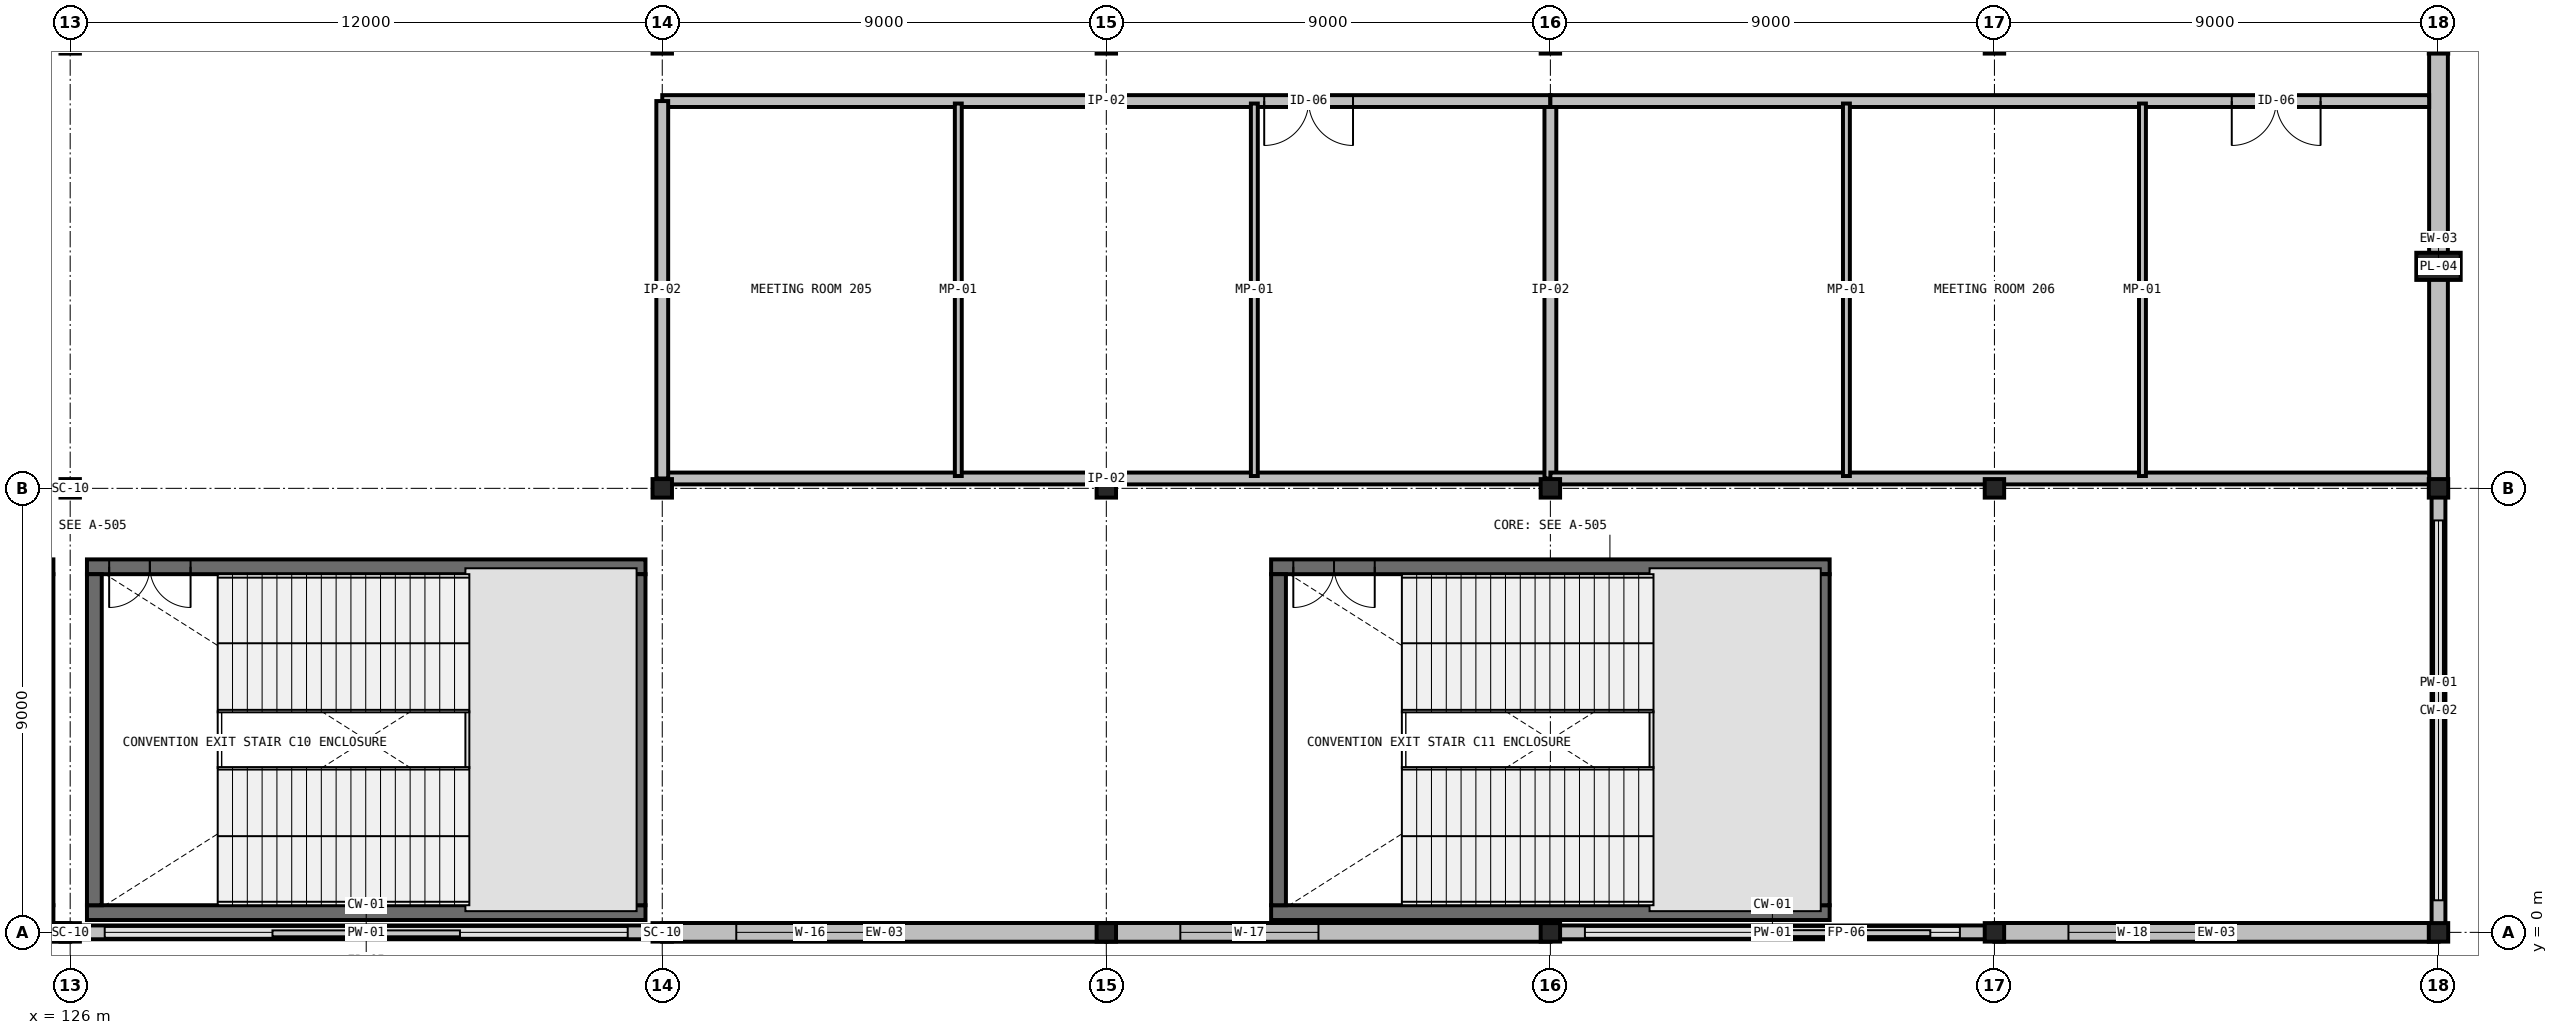
"""IFC4 building model, lengths in metres.
Left out: names, types, materials, properties, quantities, classifications, styles, units other than length and angle.
Written with IfcOpenShell. Run it as: python <this file> out.ifc"""

import sys

from ifc_helpers import new_model, si_unit, direction, frame, frame_2d, origin, origin_2d, place, context, subcontext, project, spatial, rectangle, i_section, extrude, element, fill, save


model = new_model("IFC4")
c1 = context("Model", 3, precision=1e-05, world=origin(), true_north=direction((0.0, 1.0)))
c2 = subcontext(c1, "Body", "Model", "MODEL_VIEW")
j1 = project(units=[si_unit("LENGTHUNIT", "METRE"), si_unit("PLANEANGLEUNIT", "RADIAN")], contexts=[c1])
p1 = place(None, origin())
s1 = spatial("IfcSite", under=j1, at=p1, CompositionType="ELEMENT")
p2 = place(p1, origin())
s2 = spatial("IfcBuilding", under=s1, at=p2, CompositionType="ELEMENT")
p3 = place(p2, frame((0.0, 0.0, 12.0)))
s3 = spatial("IfcBuildingStorey", under=s2, at=p3, CompositionType="ELEMENT", Elevation=12.0)
for number, where, z_axis, x_axis in (
    (1, (126.0, 0.0, 0.0), (0.0, 0.0, 1.0), (1.0, 0.0, 0.0)),
    (2, (126.0, 9.0, 0.0), (0.0, 0.0, 1.0), (1.0, 0.0, 0.0)),
    (3, (126.0, 18.0, 0.0), (0.0, 0.0, 1.0), (1.0, 0.0, 0.0)),
    (4, (138.0, 0.0, 0.0), (0.0, 0.0, 1.0), (1.0, 0.0, 0.0)),
    (5, (138.0, 9.0, 0.0), (0.0, 0.0, 1.0), (1.0, 0.0, 0.0)),
    (6, (138.0, 18.0, 0.0), (0.0, 0.0, 1.0), (1.0, 0.0, 0.0)),
    (7, (147.0, 0.0, 0.0), (0.0, 0.0, 1.0), (1.0, 0.0, 0.0)),
    (8, (147.0, 9.0, 0.0), (0.0, 0.0, 1.0), (1.0, 0.0, 0.0)),
    (9, (147.0, 18.0, 0.0), (0.0, 0.0, 1.0), (1.0, 0.0, 0.0)),
    (10, (156.0, 0.0, 0.0), (0.0, 0.0, 1.0), (1.0, 0.0, 0.0)),
    (11, (156.0, 9.0, 0.0), (0.0, 0.0, 1.0), (1.0, 0.0, 0.0)),
    (12, (156.0, 18.0, 0.0), (0.0, 0.0, 1.0), (1.0, 0.0, 0.0)),
    (13, (165.0, 0.0, 0.0), (0.0, 0.0, 1.0), (1.0, 0.0, 0.0)),
    (14, (165.0, 9.0, 0.0), (0.0, 0.0, 1.0), (1.0, 0.0, 0.0)),
    (15, (165.0, 18.0, 0.0), (0.0, 0.0, 1.0), (1.0, 0.0, 0.0)),
    (16, (174.0, 0.0, 0.0), (0.0, 0.0, 1.0), (1.0, 0.0, 0.0)),
    (17, (174.0, 9.0, 0.0), (0.0, 0.0, 1.0), (1.0, 0.0, 0.0)),
    (18, (174.0, 18.0, 0.0), (0.0, 0.0, 1.0), (1.0, 0.0, 0.0)),
):
    element("IfcColumn", number, at=place(p3, frame(where, z_axis=z_axis, x_axis=x_axis)), inside=s3, PredefinedType="COLUMN", context=c2, shape_type="SweptSolid", body=[
        extrude(i_section(OverallWidth=0.394, OverallDepth=0.375, WebThickness=0.017, FlangeThickness=0.028, FilletRadius=0.031, at=origin_2d()), origin(), (0.0, 0.0, 1.0), 6.0),
    ])
p4 = place(p3, frame((174.0, 13.5, 0.0), z_axis=(0.0, 0.0, 1.0), x_axis=(0.0, 1.0, 0.0)))
e19 = element("IfcColumn", 19, at=p4, inside=s3, PredefinedType="PILASTER", context=c2, shape_type="SweptSolid", body=[
    extrude(rectangle(XDim=0.55, YDim=0.9, at=origin_2d()), origin(), (0.0, 0.0, 1.0), 6.0),
])
p5 = place(p3, frame((125.66, 0.4, 0.0), z_axis=(0.0, 0.0, 1.0), x_axis=(-1.0, 0.0, 0.0)))
e20 = element("IfcWall", 20, at=p5, inside=s3, PredefinedType="SHEAR", context=c2, shape_type="SweptSolid", body=[
    extrude(rectangle(XDim=11.32, YDim=0.3, at=frame_2d((5.66, 0.0))), origin(), (0.0, 0.0, 1.0), 6.0),
])
p6 = place(p3, frame((125.66, 7.41, 0.0), z_axis=(0.0, 0.0, 1.0), x_axis=(-1.0, 0.0, 0.0)))
e21 = element("IfcWall", 21, at=p6, inside=s3, PredefinedType="SHEAR", context=c2, shape_type="SweptSolid", body=[
    extrude(rectangle(XDim=11.32, YDim=0.3, at=frame_2d((5.66, 0.0))), origin(), (0.0, 0.0, 1.0), 6.0),
])
p7 = place(p6, frame((9.22, 0.0, 0.0)))
e22 = element("IfcOpeningElement", 22, at=p7, cuts=e21, PredefinedType="OPENING", context=c2, shape_type="SweptSolid", body=[
    extrude(rectangle(XDim=1.65, YDim=2.25, at=frame_2d((0.825, 1.125))), frame((0.0, 0.165, 0.0), z_axis=(0.0, -1.0, 0.0), x_axis=(1.0, 0.0, 0.0)), (0.0, 0.0, 1.0), 0.33),
])
p8 = place(p3, frame((125.51, 0.55, 0.0), z_axis=(0.0, 0.0, 1.0), x_axis=(0.0, 1.0, 0.0)))
e23 = element("IfcWall", 23, at=p8, inside=s3, PredefinedType="SHEAR", context=c2, shape_type="SweptSolid", body=[
    extrude(rectangle(XDim=6.71, YDim=0.3, at=frame_2d((3.355, 0.0))), origin(), (0.0, 0.0, 1.0), 6.0),
])
p9 = place(p3, frame((137.66, 0.4, 0.0), z_axis=(0.0, 0.0, 1.0), x_axis=(-1.0, 0.0, 0.0)))
e24 = element("IfcWall", 24, at=p9, inside=s3, PredefinedType="SHEAR", context=c2, shape_type="SweptSolid", body=[
    extrude(rectangle(XDim=11.32, YDim=0.3, at=frame_2d((5.66, 0.0))), origin(), (0.0, 0.0, 1.0), 6.0),
])
p10 = place(p3, frame((137.66, 7.41, 0.0), z_axis=(0.0, 0.0, 1.0), x_axis=(-1.0, 0.0, 0.0)))
e25 = element("IfcWall", 25, at=p10, inside=s3, PredefinedType="SHEAR", context=c2, shape_type="SweptSolid", body=[
    extrude(rectangle(XDim=11.32, YDim=0.3, at=frame_2d((5.66, 0.0))), origin(), (0.0, 0.0, 1.0), 6.0),
])
p11 = place(p10, frame((9.22, 0.0, 0.0)))
e26 = element("IfcOpeningElement", 26, at=p11, cuts=e25, PredefinedType="OPENING", context=c2, shape_type="SweptSolid", body=[
    extrude(rectangle(XDim=1.65, YDim=2.25, at=frame_2d((0.825, 1.125))), frame((0.0, 0.165, 0.0), z_axis=(0.0, -1.0, 0.0), x_axis=(1.0, 0.0, 0.0)), (0.0, 0.0, 1.0), 0.33),
])
for number, where, z_axis, x_axis in (
    (27, (126.49, 7.26, 0.0), (0.0, 0.0, 1.0), (0.0, -1.0, 0.0)),
    (28, (137.51, 0.55, 0.0), (0.0, 0.0, 1.0), (0.0, 1.0, 0.0)),
):
    element("IfcWall", number, at=place(p3, frame(where, z_axis=z_axis, x_axis=x_axis)), inside=s3, PredefinedType="SHEAR", context=c2, shape_type="SweptSolid", body=[
        extrude(rectangle(XDim=6.71, YDim=0.3, at=frame_2d((3.355, 0.0))), origin(), (0.0, 0.0, 1.0), 6.0),
    ])
p12 = place(p3, frame((161.66, 0.4, 0.0), z_axis=(0.0, 0.0, 1.0), x_axis=(-1.0, 0.0, 0.0)))
e29 = element("IfcWall", 29, at=p12, inside=s3, PredefinedType="SHEAR", context=c2, shape_type="SweptSolid", body=[
    extrude(rectangle(XDim=11.32, YDim=0.3, at=frame_2d((5.66, 0.0))), origin(), (0.0, 0.0, 1.0), 6.0),
])
p13 = place(p3, frame((161.66, 7.41, 0.0), z_axis=(0.0, 0.0, 1.0), x_axis=(-1.0, 0.0, 0.0)))
e30 = element("IfcWall", 30, at=p13, inside=s3, PredefinedType="SHEAR", context=c2, shape_type="SweptSolid", body=[
    extrude(rectangle(XDim=11.32, YDim=0.3, at=frame_2d((5.66, 0.0))), origin(), (0.0, 0.0, 1.0), 6.0),
])
p14 = place(p13, frame((9.22, 0.0, 0.0)))
e31 = element("IfcOpeningElement", 31, at=p14, cuts=e30, PredefinedType="OPENING", context=c2, shape_type="SweptSolid", body=[
    extrude(rectangle(XDim=1.65, YDim=2.25, at=frame_2d((0.825, 1.125))), frame((0.0, 0.165, 0.0), z_axis=(0.0, -1.0, 0.0), x_axis=(1.0, 0.0, 0.0)), (0.0, 0.0, 1.0), 0.33),
])
for number, where, z_axis, x_axis in (
    (32, (150.49, 7.26, 0.0), (0.0, 0.0, 1.0), (0.0, -1.0, 0.0)),
    (33, (161.51, 0.55, 0.0), (0.0, 0.0, 1.0), (0.0, 1.0, 0.0)),
):
    element("IfcWall", number, at=place(p3, frame(where, z_axis=z_axis, x_axis=x_axis)), inside=s3, PredefinedType="SHEAR", context=c2, shape_type="SweptSolid", body=[
        extrude(rectangle(XDim=6.71, YDim=0.3, at=frame_2d((3.355, 0.0))), origin(), (0.0, 0.0, 1.0), 6.0),
    ])
p15 = place(p3, frame((114.0, 0.0, 0.0), z_axis=(0.0, 0.0, 1.0), x_axis=(1.0, 0.0, 0.0)))
e34 = element("IfcWall", 34, at=p15, inside=s3, PredefinedType="STANDARD", context=c2, shape_type="SweptSolid", body=[
    extrude(rectangle(XDim=12.0, YDim=0.38, at=frame_2d((6.0, 0.0))), origin(), (0.0, 0.0, 1.0), 4.746),
])
p16 = place(p15, frame((1.5, 0.0, 0.85)))
e35 = element("IfcOpeningElement", 35, at=p16, cuts=e34, PredefinedType="OPENING", context=c2, shape_type="SweptSolid", body=[
    extrude(rectangle(XDim=2.2, YDim=1.95, at=frame_2d((1.1, 0.975))), frame((0.0, 0.205, 0.0), z_axis=(0.0, -1.0, 0.0), x_axis=(1.0, 0.0, 0.0)), (0.0, 0.0, 1.0), 0.41),
])
p17 = place(p3, frame((126.0, 0.0, 0.0), z_axis=(0.0, 0.0, 1.0), x_axis=(1.0, 0.0, 0.0)))
e36 = element("IfcWall", 36, at=p17, inside=s3, PredefinedType="PARAPET", context=c2, shape_type="SweptSolid", body=[
    extrude(rectangle(XDim=12.0, YDim=0.28, at=frame_2d((6.0, 0.0))), origin(), (0.0, 0.0, 1.0), 0.2),
])
p18 = place(p3, frame((138.0, 0.0, 0.0), z_axis=(0.0, 0.0, 1.0), x_axis=(1.0, 0.0, 0.0)))
e37 = element("IfcWall", 37, at=p18, inside=s3, PredefinedType="STANDARD", context=c2, shape_type="SweptSolid", body=[
    extrude(rectangle(XDim=9.0, YDim=0.38, at=frame_2d((4.5, 0.0))), origin(), (0.0, 0.0, 1.0), 4.746),
])
p19 = place(p18, frame((1.5, 0.0, 0.85)))
e38 = element("IfcOpeningElement", 38, at=p19, cuts=e37, PredefinedType="OPENING", context=c2, shape_type="SweptSolid", body=[
    extrude(rectangle(XDim=3.0, YDim=2.3, at=frame_2d((1.5, 1.15))), frame((0.0, 0.205, 0.0), z_axis=(0.0, -1.0, 0.0), x_axis=(1.0, 0.0, 0.0)), (0.0, 0.0, 1.0), 0.41),
])
p20 = place(p3, frame((147.0, 0.0, 0.0), z_axis=(0.0, 0.0, 1.0), x_axis=(1.0, 0.0, 0.0)))
e39 = element("IfcWall", 39, at=p20, inside=s3, PredefinedType="STANDARD", context=c2, shape_type="SweptSolid", body=[
    extrude(rectangle(XDim=9.0, YDim=0.38, at=frame_2d((4.5, 0.0))), origin(), (0.0, 0.0, 1.0), 4.746),
])
p21 = place(p20, frame((1.5, 0.0, 0.85)))
e40 = element("IfcOpeningElement", 40, at=p21, cuts=e39, PredefinedType="OPENING", context=c2, shape_type="SweptSolid", body=[
    extrude(rectangle(XDim=2.8, YDim=2.4, at=frame_2d((1.4, 1.2))), frame((0.0, 0.205, 0.0), z_axis=(0.0, -1.0, 0.0), x_axis=(1.0, 0.0, 0.0)), (0.0, 0.0, 1.0), 0.41),
])
p22 = place(p3, frame((156.0, 0.0, 0.0), z_axis=(0.0, 0.0, 1.0), x_axis=(1.0, 0.0, 0.0)))
e41 = element("IfcWall", 41, at=p22, inside=s3, PredefinedType="PARAPET", context=c2, shape_type="SweptSolid", body=[
    extrude(rectangle(XDim=9.0, YDim=0.28, at=frame_2d((4.5, 0.0))), origin(), (0.0, 0.0, 1.0), 0.2),
])
p23 = place(p3, frame((165.0, 0.0, 0.0), z_axis=(0.0, 0.0, 1.0), x_axis=(1.0, 0.0, 0.0)))
e42 = element("IfcWall", 42, at=p23, inside=s3, PredefinedType="STANDARD", context=c2, shape_type="SweptSolid", body=[
    extrude(rectangle(XDim=9.0, YDim=0.38, at=frame_2d((4.5, 0.0))), origin(), (0.0, 0.0, 1.0), 4.746),
])
p24 = place(p23, frame((1.5, 0.0, 0.85)))
e43 = element("IfcOpeningElement", 43, at=p24, cuts=e42, PredefinedType="OPENING", context=c2, shape_type="SweptSolid", body=[
    extrude(rectangle(XDim=2.6, YDim=2.25, at=frame_2d((1.3, 1.125))), frame((0.0, 0.205, 0.0), z_axis=(0.0, -1.0, 0.0), x_axis=(1.0, 0.0, 0.0)), (0.0, 0.0, 1.0), 0.41),
])
p25 = place(p3, frame((174.0, 0.0, 0.0), z_axis=(0.0, 0.0, 1.0), x_axis=(0.0, 1.0, 0.0)))
e44 = element("IfcWall", 44, at=p25, inside=s3, PredefinedType="PARAPET", context=c2, shape_type="SweptSolid", body=[
    extrude(rectangle(XDim=9.0, YDim=0.28, at=frame_2d((4.5, 0.0))), origin(), (0.0, 0.0, 1.0), 0.2),
])
p26 = place(p3, frame((174.0, 9.0, 0.0), z_axis=(0.0, 0.0, 1.0), x_axis=(0.0, 1.0, 0.0)))
e45 = element("IfcWall", 45, at=p26, inside=s3, PredefinedType="STANDARD", context=c2, shape_type="SweptSolid", body=[
    extrude(rectangle(XDim=9.0, YDim=0.38, at=frame_2d((4.5, 0.0))), origin(), (0.0, 0.0, 1.0), 5.239),
])
p27 = place(p3, frame((138.0, 9.2, 0.0), z_axis=(0.0, 0.0, 1.0), x_axis=(1.0, 0.0, 0.0)))
e46 = element("IfcWall", 46, at=p27, inside=s3, PredefinedType="PARTITIONING", context=c2, shape_type="SweptSolid", body=[
    extrude(rectangle(XDim=18.0, YDim=0.24, at=frame_2d((9.0, 0.0))), origin(), (0.0, 0.0, 1.0), 5.65),
])
p28 = place(p3, frame((156.0, 9.2, 0.0), z_axis=(0.0, 0.0, 1.0), x_axis=(0.0, 1.0, 0.0)))
e47 = element("IfcWall", 47, at=p28, inside=s3, PredefinedType="PARTITIONING", context=c2, shape_type="SweptSolid", body=[
    extrude(rectangle(XDim=7.65, YDim=0.24, at=frame_2d((3.825, 0.0))), origin(), (0.0, 0.0, 1.0), 4.883),
])
p29 = place(p3, frame((156.0, 16.85, 0.0), z_axis=(0.0, 0.0, 1.0), x_axis=(-1.0, 0.0, 0.0)))
e48 = element("IfcWall", 48, at=p29, inside=s3, PredefinedType="PARTITIONING", context=c2, shape_type="SweptSolid", body=[
    extrude(rectangle(XDim=18.0, YDim=0.24, at=frame_2d((9.0, 0.0))), origin(), (0.0, 0.0, 1.0), 5.65),
])
p30 = place(p29, frame((4.0, 0.0, 0.0)))
e49 = element("IfcOpeningElement", 49, at=p30, cuts=e48, PredefinedType="OPENING", context=c2, shape_type="SweptSolid", body=[
    extrude(rectangle(XDim=1.8, YDim=2.3, at=frame_2d((0.9, 1.15))), frame((0.0, 0.135, 0.0), z_axis=(0.0, -1.0, 0.0), x_axis=(1.0, 0.0, 0.0)), (0.0, 0.0, 1.0), 0.27),
])
p31 = place(p3, frame((138.0, 16.85, 0.0), z_axis=(0.0, 0.0, 1.0), x_axis=(0.0, -1.0, 0.0)))
e50 = element("IfcWall", 50, at=p31, inside=s3, PredefinedType="PARTITIONING", context=c2, shape_type="SweptSolid", body=[
    extrude(rectangle(XDim=7.65, YDim=0.24, at=frame_2d((3.825, 0.0))), origin(), (0.0, 0.0, 1.0), 4.883),
])
p32 = place(p3, frame((156.0, 9.2, 0.0), z_axis=(0.0, 0.0, 1.0), x_axis=(1.0, 0.0, 0.0)))
e51 = element("IfcWall", 51, at=p32, inside=s3, PredefinedType="PARTITIONING", context=c2, shape_type="SweptSolid", body=[
    extrude(rectangle(XDim=17.81, YDim=0.24, at=frame_2d((8.905, 0.0))), origin(), (0.0, 0.0, 1.0), 5.65),
])
p33 = place(p3, frame((173.81, 16.85, 0.0), z_axis=(0.0, 0.0, 1.0), x_axis=(-1.0, 0.0, 0.0)))
e52 = element("IfcWall", 52, at=p33, inside=s3, PredefinedType="PARTITIONING", context=c2, shape_type="SweptSolid", body=[
    extrude(rectangle(XDim=17.81, YDim=0.24, at=frame_2d((8.905, 0.0))), origin(), (0.0, 0.0, 1.0), 5.65),
])
p34 = place(p33, frame((2.2, 0.0, 0.0)))
e53 = element("IfcOpeningElement", 53, at=p34, cuts=e52, PredefinedType="OPENING", context=c2, shape_type="SweptSolid", body=[
    extrude(rectangle(XDim=1.8, YDim=2.3, at=frame_2d((0.9, 1.15))), frame((0.0, 0.135, 0.0), z_axis=(0.0, -1.0, 0.0), x_axis=(1.0, 0.0, 0.0)), (0.0, 0.0, 1.0), 0.27),
])
for number, where, z_axis, x_axis in (
    (54, (144.0, 9.25, 0.0), (0.0, 0.0, 1.0), (0.0, 1.0, 0.0)),
    (55, (150.0, 9.25, 0.0), (0.0, 0.0, 1.0), (0.0, 1.0, 0.0)),
    (56, (162.0, 9.25, 0.0), (0.0, 0.0, 1.0), (0.0, 1.0, 0.0)),
    (57, (168.0, 9.25, 0.0), (0.0, 0.0, 1.0), (0.0, 1.0, 0.0)),
):
    element("IfcWall", number, at=place(p3, frame(where, z_axis=z_axis, x_axis=x_axis)), inside=s3, PredefinedType="MOVABLE", context=c2, shape_type="SweptSolid", body=[
        extrude(rectangle(XDim=7.55, YDim=0.14, at=frame_2d((3.775, 0.0))), origin(), (0.0, 0.0, 1.0), 5.65),
    ])
p35 = place(p11, origin())
e58 = element("IfcDoor", 58, at=p35, inside=s3, OperationType="DOUBLE_DOOR_SINGLE_SWING", PredefinedType="DOOR", context=c2, shape_type="SweptSolid", body=[
    extrude(rectangle(XDim=1.65, YDim=2.25, at=frame_2d((0.825, 1.125))), frame((0.0, 0.025, 0.0), z_axis=(0.0, -1.0, 0.0), x_axis=(1.0, 0.0, 0.0)), (0.0, 0.0, 1.0), 0.05),
])
fill(e26, e58)
p36 = place(p14, origin())
e59 = element("IfcDoor", 59, at=p36, inside=s3, OperationType="DOUBLE_DOOR_SINGLE_SWING", PredefinedType="DOOR", context=c2, shape_type="SweptSolid", body=[
    extrude(rectangle(XDim=1.65, YDim=2.25, at=frame_2d((0.825, 1.125))), frame((0.0, 0.025, 0.0), z_axis=(0.0, -1.0, 0.0), x_axis=(1.0, 0.0, 0.0)), (0.0, 0.0, 1.0), 0.05),
])
fill(e31, e59)
p37 = place(p19, origin())
e60 = element("IfcWindow", 60, at=p37, inside=s3, PartitioningType="TRIPLE_PANEL_VERTICAL", PredefinedType="WINDOW", context=c2, shape_type="SweptSolid", body=[
    extrude(rectangle(XDim=3.0, YDim=2.3, at=frame_2d((1.5, 1.15))), frame((0.0, 0.03, 0.0), z_axis=(0.0, -1.0, 0.0), x_axis=(1.0, 0.0, 0.0)), (0.0, 0.0, 1.0), 0.06),
])
fill(e38, e60)
p38 = place(p21, origin())
e61 = element("IfcWindow", 61, at=p38, inside=s3, PartitioningType="DOUBLE_PANEL_VERTICAL", PredefinedType="WINDOW", context=c2, shape_type="SweptSolid", body=[
    extrude(rectangle(XDim=2.8, YDim=2.4, at=frame_2d((1.4, 1.2))), frame((0.0, 0.03, 0.0), z_axis=(0.0, -1.0, 0.0), x_axis=(1.0, 0.0, 0.0)), (0.0, 0.0, 1.0), 0.06),
])
fill(e40, e61)
p39 = place(p24, origin())
e62 = element("IfcWindow", 62, at=p39, inside=s3, PartitioningType="DOUBLE_PANEL_VERTICAL", PredefinedType="WINDOW", context=c2, shape_type="SweptSolid", body=[
    extrude(rectangle(XDim=2.6, YDim=2.25, at=frame_2d((1.3, 1.125))), frame((0.0, 0.03, 0.0), z_axis=(0.0, -1.0, 0.0), x_axis=(1.0, 0.0, 0.0)), (0.0, 0.0, 1.0), 0.06),
])
fill(e43, e62)
p40 = place(p30, origin())
e63 = element("IfcDoor", 63, at=p40, inside=s3, OperationType="DOUBLE_DOOR_SINGLE_SWING", PredefinedType="DOOR", context=c2, shape_type="SweptSolid", body=[
    extrude(rectangle(XDim=1.8, YDim=2.3, at=frame_2d((0.9, 1.15))), frame((0.0, 0.025, 0.0), z_axis=(0.0, -1.0, 0.0), x_axis=(1.0, 0.0, 0.0)), (0.0, 0.0, 1.0), 0.05),
])
fill(e49, e63)
p41 = place(p34, origin())
e64 = element("IfcDoor", 64, at=p41, inside=s3, OperationType="DOUBLE_DOOR_SINGLE_SWING", PredefinedType="DOOR", context=c2, shape_type="SweptSolid", body=[
    extrude(rectangle(XDim=1.8, YDim=2.3, at=frame_2d((0.9, 1.15))), frame((0.0, 0.025, 0.0), z_axis=(0.0, -1.0, 0.0), x_axis=(1.0, 0.0, 0.0)), (0.0, 0.0, 1.0), 0.05),
])
fill(e53, e64)
save(model, sys.argv[1])
